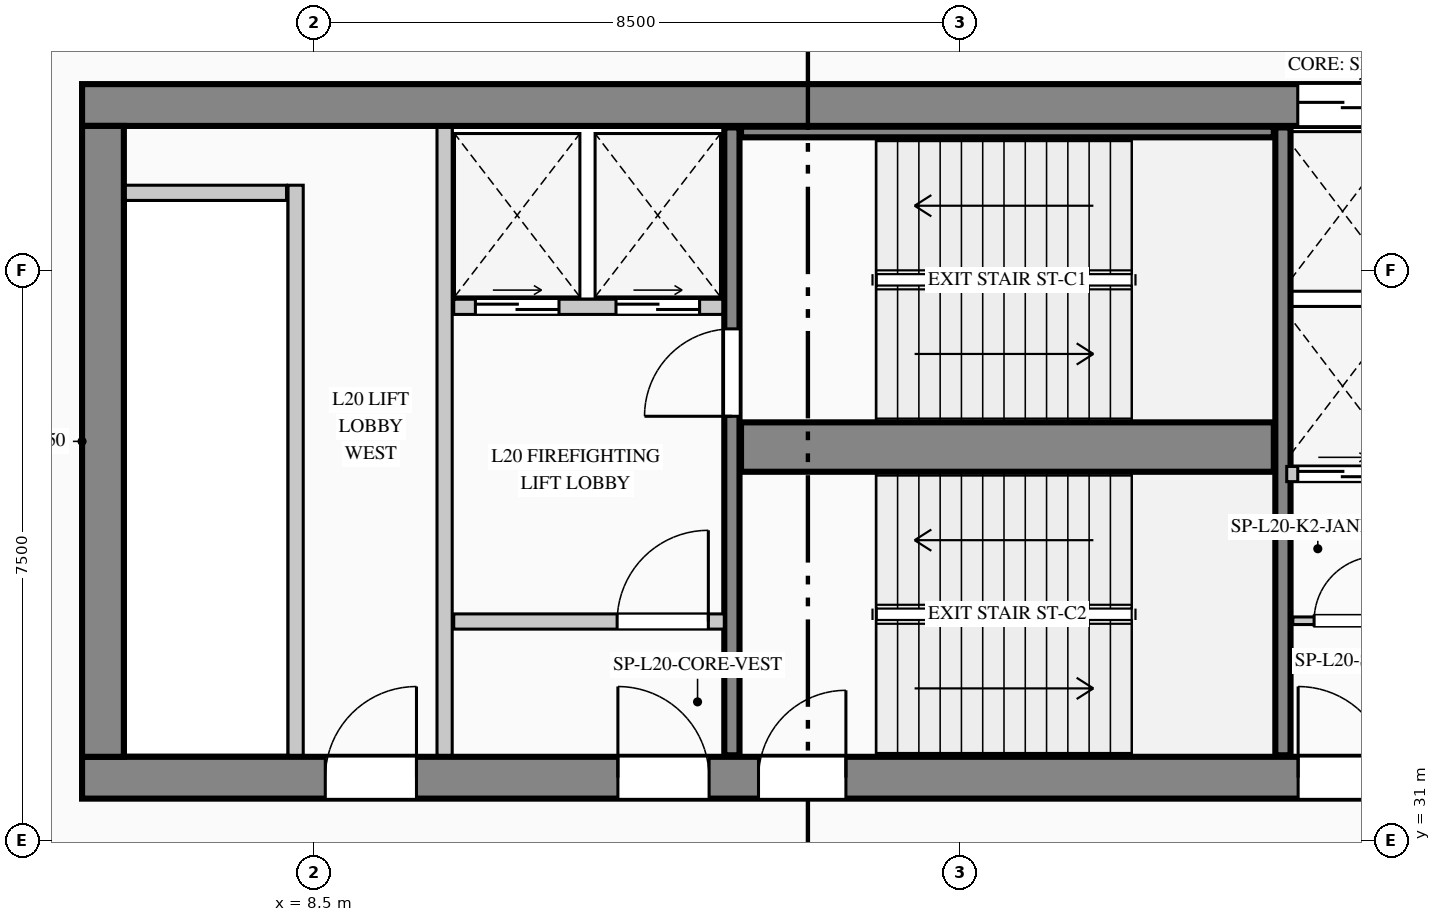
"""IFC4 building model, lengths in metres.
Left out: names, types, materials, properties, quantities, classifications, styles, units other than length and angle.
Written with IfcOpenShell. Run it as: python <this file> out.ifc"""

import sys

from ifc_helpers import new_model, si_unit, direction, frame, frame_2d, origin, place, context, subcontext, project, spatial, rectangle, extrude, element, fill, save


model = new_model("IFC4")
c1 = context("Model", 3, precision=1e-05, world=origin(), true_north=direction((0.0, 1.0)))
c2 = subcontext(c1, "Body", "Model", "MODEL_VIEW")
j1 = project(units=[si_unit("LENGTHUNIT", "METRE"), si_unit("PLANEANGLEUNIT", "RADIAN")], contexts=[c1])
p1 = place(None, origin())
s1 = spatial("IfcSite", under=j1, at=p1, CompositionType="ELEMENT")
p2 = place(p1, origin())
s2 = spatial("IfcBuilding", under=s1, at=p2, CompositionType="ELEMENT")
p3 = place(p2, frame((0.0, 0.0, 88.6)))
s3 = spatial("IfcBuildingStorey", under=s2, at=p3, CompositionType="ELEMENT", Elevation=88.6)
p4 = place(p3, frame((5.45, 40.675, 0.0), z_axis=(0.0, 0.0, 1.0), x_axis=(1.0, 0.0, 0.0)))
e1 = element("IfcWall", 1, at=p4, inside=s3, PredefinedType="SHEAR", context=c2, shape_type="SweptSolid", body=[
    extrude(rectangle(XDim=17.95, YDim=0.55, at=frame_2d((8.975, 0.0))), origin(), (0.0, 0.0, 1.0), 4.4),
])
p5 = place(p4, frame((15.995, 0.0, 0.0)))
e2 = element("IfcOpeningElement", 2, at=p5, cuts=e1, PredefinedType="OPENING", context=c2, shape_type="SweptSolid", body=[
    extrude(rectangle(XDim=1.18, YDim=2.25, at=frame_2d((0.59, 1.125))), frame((0.0, 0.285, 0.0), z_axis=(0.0, -1.0, 0.0), x_axis=(1.0, 0.0, 0.0)), (0.0, 0.0, 1.0), 0.57),
])
p6 = place(p3, frame((5.45, 31.825, 0.0), z_axis=(0.0, 0.0, 1.0), x_axis=(1.0, 0.0, 0.0)))
e3 = element("IfcWall", 3, at=p6, inside=s3, PredefinedType="SHEAR", context=c2, shape_type="SweptSolid", body=[
    extrude(rectangle(XDim=17.95, YDim=0.55, at=frame_2d((8.975, 0.0))), origin(), (0.0, 0.0, 1.0), 4.4),
])
p7 = place(p6, frame((3.2, 0.0, 0.0)))
e4 = element("IfcOpeningElement", 4, at=p7, cuts=e3, PredefinedType="OPENING", context=c2, shape_type="SweptSolid", body=[
    extrude(rectangle(XDim=1.2, YDim=2.2, at=frame_2d((0.6, 1.1))), frame((0.0, 0.285, 0.0), z_axis=(0.0, -1.0, 0.0), x_axis=(1.0, 0.0, 0.0)), (0.0, 0.0, 1.0), 0.57),
])
p8 = place(p6, frame((7.05, 0.0, 0.0)))
e5 = element("IfcOpeningElement", 5, at=p8, cuts=e3, PredefinedType="OPENING", context=c2, shape_type="SweptSolid", body=[
    extrude(rectangle(XDim=1.2, YDim=2.2, at=frame_2d((0.6, 1.1))), frame((0.0, 0.285, 0.0), z_axis=(0.0, -1.0, 0.0), x_axis=(1.0, 0.0, 0.0)), (0.0, 0.0, 1.0), 0.57),
])
p9 = place(p6, frame((8.9, 0.0, 0.0)))
e6 = element("IfcOpeningElement", 6, at=p9, cuts=e3, PredefinedType="OPENING", context=c2, shape_type="SweptSolid", body=[
    extrude(rectangle(XDim=1.15, YDim=2.2, at=frame_2d((0.575, 1.1))), frame((0.0, 0.285, 0.0), z_axis=(0.0, -1.0, 0.0), x_axis=(1.0, 0.0, 0.0)), (0.0, 0.0, 1.0), 0.57),
])
p10 = place(p6, frame((16.0, 0.0, 0.0)))
e7 = element("IfcOpeningElement", 7, at=p10, cuts=e3, PredefinedType="OPENING", context=c2, shape_type="SweptSolid", body=[
    extrude(rectangle(XDim=1.2, YDim=2.2, at=frame_2d((0.6, 1.1))), frame((0.0, 0.285, 0.0), z_axis=(0.0, -1.0, 0.0), x_axis=(1.0, 0.0, 0.0)), (0.0, 0.0, 1.0), 0.57),
])
p11 = place(p3, frame((5.725, 32.1, 0.0), z_axis=(0.0, 0.0, 1.0), x_axis=(0.0, 1.0, 0.0)))
e8 = element("IfcWall", 8, at=p11, inside=s3, PredefinedType="SHEAR", context=c2, shape_type="SweptSolid", body=[
    extrude(rectangle(XDim=8.3, YDim=0.55, at=frame_2d((4.15, 0.0))), origin(), (0.0, 0.0, 1.0), 4.4),
])
p12 = place(p3, frame((14.0, 32.12, 0.0), z_axis=(0.0, 0.0, 1.0), x_axis=(0.0, 1.0, 0.0)))
e9 = element("IfcWall", 9, at=p12, inside=s3, PredefinedType="SHEAR", context=c2, shape_type="SweptSolid", body=[
    extrude(rectangle(XDim=8.26, YDim=0.2, at=frame_2d((4.13, 0.0))), origin(), (0.0, 0.0, 1.0), 4.4),
])
p13 = place(p12, frame((4.46, 0.0, 0.0)))
e10 = element("IfcOpeningElement", 10, at=p13, cuts=e9, PredefinedType="OPENING", context=c2, shape_type="SweptSolid", body=[
    extrude(rectangle(XDim=1.15, YDim=2.2, at=frame_2d((0.575, 1.1))), frame((0.0, 0.11, 0.0), z_axis=(0.0, -1.0, 0.0), x_axis=(1.0, 0.0, 0.0)), (0.0, 0.0, 1.0), 0.22),
])
p14 = place(p3, frame((14.12, 36.175, 0.0), z_axis=(0.0, 0.0, 1.0), x_axis=(1.0, 0.0, 0.0)))
e11 = element("IfcWall", 11, at=p14, inside=s3, PredefinedType="SHEAR", context=c2, shape_type="SweptSolid", body=[
    extrude(rectangle(XDim=7.01, YDim=0.65, at=frame_2d((3.505, 0.0))), origin(), (0.0, 0.0, 1.0), 4.4),
])
p15 = place(p3, frame((21.25, 32.12, 0.0), z_axis=(0.0, 0.0, 1.0), x_axis=(0.0, 1.0, 0.0)))
e12 = element("IfcWall", 12, at=p15, inside=s3, PredefinedType="SHEAR", context=c2, shape_type="SweptSolid", body=[
    extrude(rectangle(XDim=8.26, YDim=0.2, at=frame_2d((4.13, 0.0))), origin(), (0.0, 0.0, 1.0), 4.4),
])
p16 = place(p3, frame((14.12, 40.32, 0.0), z_axis=(0.0, 0.0, 1.0), x_axis=(1.0, 0.0, 0.0)))
e13 = element("IfcWall", 13, at=p16, inside=s3, PredefinedType="SHEAR", context=c2, shape_type="SweptSolid", body=[
    extrude(rectangle(XDim=7.01, YDim=0.14, at=frame_2d((3.505, 0.0))), origin(), (0.0, 0.0, 1.0), 4.4),
])
p17 = place(p3, frame((8.523, 4.84, 0.0), z_axis=(0.0, 0.0, 1.0), x_axis=(-0.150394554312, 0.988626055712, 0.0)))
e14 = element("IfcWall", 14, at=p17, inside=s3, PredefinedType="STANDARD", context=c2, shape_type="SweptSolid", body=[
    extrude(rectangle(XDim=36.738, YDim=0.28, at=frame_2d((18.369, 0.0))), origin(), (0.0, 0.0, 1.0), 4.115),
])
p18 = place(p17, frame((22.612, 0.0, 0.9)))
e15 = element("IfcOpeningElement", 15, at=p18, cuts=e14, PredefinedType="OPENING", context=c2, shape_type="SweptSolid", body=[
    extrude(rectangle(XDim=1.8, YDim=2.1, at=frame_2d((0.9, 1.05))), frame((0.0, 0.15, 0.0), z_axis=(0.0, -1.0, 0.0), x_axis=(1.0, 0.0, 0.0)), (0.0, 0.0, 1.0), 0.3),
])
p19 = place(p3, frame((8.26, 32.12, 0.0), z_axis=(0.0, 0.0, 1.0), x_axis=(0.0, 1.0, 0.0)))
e16 = element("IfcWall", 16, at=p19, inside=s3, PredefinedType="PARTITIONING", context=c2, shape_type="SweptSolid", body=[
    extrude(rectangle(XDim=7.5, YDim=0.2, at=frame_2d((3.75, 0.0))), origin(), (0.0, 0.0, 1.0), 4.115),
])
p20 = place(p3, frame((6.02, 39.52, 0.0), z_axis=(0.0, 0.0, 1.0), x_axis=(1.0, 0.0, 0.0)))
e17 = element("IfcWall", 17, at=p20, inside=s3, PredefinedType="PARTITIONING", context=c2, shape_type="SweptSolid", body=[
    extrude(rectangle(XDim=2.12, YDim=0.2, at=frame_2d((1.06, 0.0))), origin(), (0.0, 0.0, 1.0), 4.115),
])
p21 = place(p3, frame((10.22, 32.12, 0.0), z_axis=(0.0, 0.0, 1.0), x_axis=(0.0, 1.0, 0.0)))
e18 = element("IfcWall", 18, at=p21, inside=s3, PredefinedType="PARTITIONING", context=c2, shape_type="SweptSolid", body=[
    extrude(rectangle(XDim=8.26, YDim=0.2, at=frame_2d((4.13, 0.0))), origin(), (0.0, 0.0, 1.0), 4.115),
])
p22 = place(p3, frame((10.34, 38.02, 0.0), z_axis=(0.0, 0.0, 1.0), x_axis=(1.0, 0.0, 0.0)))
e19 = element("IfcWall", 19, at=p22, inside=s3, PredefinedType="PARTITIONING", context=c2, shape_type="SweptSolid", body=[
    extrude(rectangle(XDim=3.54, YDim=0.2, at=frame_2d((1.77, 0.0))), origin(), (0.0, 0.0, 1.0), 4.115),
])
p23 = place(p22, frame((0.285, 0.0, 0.0)))
e20 = element("IfcOpeningElement", 20, at=p23, cuts=e19, PredefinedType="OPENING", context=c2, shape_type="SweptSolid", body=[
    extrude(rectangle(XDim=1.1, YDim=2.2, at=frame_2d((0.55, 1.1))), frame((0.0, 0.11, 0.0), z_axis=(0.0, -1.0, 0.0), x_axis=(1.0, 0.0, 0.0)), (0.0, 0.0, 1.0), 0.22),
])
p24 = place(p22, frame((2.135, 0.0, 0.0)))
e21 = element("IfcOpeningElement", 21, at=p24, cuts=e19, PredefinedType="OPENING", context=c2, shape_type="SweptSolid", body=[
    extrude(rectangle(XDim=1.1, YDim=2.2, at=frame_2d((0.55, 1.1))), frame((0.0, 0.11, 0.0), z_axis=(0.0, -1.0, 0.0), x_axis=(1.0, 0.0, 0.0)), (0.0, 0.0, 1.0), 0.22),
])
p25 = place(p3, frame((10.34, 33.88, 0.0), z_axis=(0.0, 0.0, 1.0), x_axis=(1.0, 0.0, 0.0)))
e22 = element("IfcWall", 22, at=p25, inside=s3, PredefinedType="PARTITIONING", context=c2, shape_type="SweptSolid", body=[
    extrude(rectangle(XDim=3.56, YDim=0.2, at=frame_2d((1.78, 0.0))), origin(), (0.0, 0.0, 1.0), 4.115),
])
p26 = place(p25, frame((2.15, 0.0, 0.0)))
e23 = element("IfcOpeningElement", 23, at=p26, cuts=e22, PredefinedType="OPENING", context=c2, shape_type="SweptSolid", body=[
    extrude(rectangle(XDim=1.2, YDim=2.2, at=frame_2d((0.6, 1.1))), frame((0.0, 0.11, 0.0), z_axis=(0.0, -1.0, 0.0), x_axis=(1.0, 0.0, 0.0)), (0.0, 0.0, 1.0), 0.22),
])
p27 = place(p3, frame((21.38, 33.89, 0.0), z_axis=(0.0, 0.0, 1.0), x_axis=(1.0, 0.0, 0.0)))
e24 = element("IfcWall", 24, at=p27, inside=s3, PredefinedType="PARTITIONING", context=c2, shape_type="SweptSolid", body=[
    extrude(rectangle(XDim=1.42, YDim=0.1, at=frame_2d((0.71, 0.0))), origin(), (0.0, 0.0, 1.0), 4.115),
])
p28 = place(p27, frame((0.28, 0.0, 0.0)))
e25 = element("IfcOpeningElement", 25, at=p28, cuts=e24, PredefinedType="OPENING", context=c2, shape_type="SweptSolid", body=[
    extrude(rectangle(XDim=0.85, YDim=2.1, at=frame_2d((0.425, 1.05))), frame((0.0, 0.06, 0.0), z_axis=(0.0, -1.0, 0.0), x_axis=(1.0, 0.0, 0.0)), (0.0, 0.0, 1.0), 0.12),
])
p29 = place(p3, frame((21.3, 35.82, 0.0), z_axis=(0.0, 0.0, 1.0), x_axis=(1.0, 0.0, 0.0)))
e26 = element("IfcWall", 26, at=p29, inside=s3, PredefinedType="PARTITIONING", context=c2, shape_type="SweptSolid", body=[
    extrude(rectangle(XDim=1.5, YDim=0.2, at=frame_2d((0.75, 0.0))), origin(), (0.0, 0.0, 1.0), 4.115),
])
p30 = place(p29, frame((0.145, 0.0, 0.0)))
e27 = element("IfcOpeningElement", 27, at=p30, cuts=e26, PredefinedType="OPENING", context=c2, shape_type="SweptSolid", body=[
    extrude(rectangle(XDim=1.18, YDim=2.25, at=frame_2d((0.59, 1.125))), frame((0.0, 0.11, 0.0), z_axis=(0.0, -1.0, 0.0), x_axis=(1.0, 0.0, 0.0)), (0.0, 0.0, 1.0), 0.22),
])
p31 = place(p7, origin())
e28 = element("IfcDoor", 28, at=p31, inside=s3, OperationType="SINGLE_SWING_RIGHT", PredefinedType="DOOR", context=c2, shape_type="SweptSolid", body=[
    extrude(rectangle(XDim=1.2, YDim=2.2, at=frame_2d((0.6, 1.1))), frame((0.0, 0.025, 0.0), z_axis=(0.0, -1.0, 0.0), x_axis=(1.0, 0.0, 0.0)), (0.0, 0.0, 1.0), 0.05),
])
fill(e4, e28)
p32 = place(p8, origin())
e29 = element("IfcDoor", 29, at=p32, inside=s3, OperationType="SINGLE_SWING_LEFT", PredefinedType="DOOR", context=c2, shape_type="SweptSolid", body=[
    extrude(rectangle(XDim=1.2, YDim=2.2, at=frame_2d((0.6, 1.1))), frame((0.0, 0.025, 0.0), z_axis=(0.0, -1.0, 0.0), x_axis=(1.0, 0.0, 0.0)), (0.0, 0.0, 1.0), 0.05),
])
fill(e5, e29)
p33 = place(p9, origin())
e30 = element("IfcDoor", 30, at=p33, inside=s3, OperationType="SINGLE_SWING_RIGHT", PredefinedType="DOOR", context=c2, shape_type="SweptSolid", body=[
    extrude(rectangle(XDim=1.15, YDim=2.2, at=frame_2d((0.575, 1.1))), frame((0.0, 0.025, 0.0), z_axis=(0.0, -1.0, 0.0), x_axis=(1.0, 0.0, 0.0)), (0.0, 0.0, 1.0), 0.05),
])
fill(e6, e30)
p34 = place(p10, origin())
e31 = element("IfcDoor", 31, at=p34, inside=s3, OperationType="SINGLE_SWING_LEFT", PredefinedType="DOOR", context=c2, shape_type="SweptSolid", body=[
    extrude(rectangle(XDim=1.2, YDim=2.2, at=frame_2d((0.6, 1.1))), frame((0.0, 0.025, 0.0), z_axis=(0.0, -1.0, 0.0), x_axis=(1.0, 0.0, 0.0)), (0.0, 0.0, 1.0), 0.05),
])
fill(e7, e31)
p35 = place(p26, origin())
e32 = element("IfcDoor", 32, at=p35, inside=s3, OperationType="SINGLE_SWING_RIGHT", PredefinedType="DOOR", context=c2, shape_type="SweptSolid", body=[
    extrude(rectangle(XDim=1.2, YDim=2.2, at=frame_2d((0.6, 1.1))), frame((0.0, 0.025, 0.0), z_axis=(0.0, -1.0, 0.0), x_axis=(1.0, 0.0, 0.0)), (0.0, 0.0, 1.0), 0.05),
])
fill(e23, e32)
p36 = place(p28, origin())
e33 = element("IfcDoor", 33, at=p36, inside=s3, OperationType="SINGLE_SWING_RIGHT", PredefinedType="DOOR", context=c2, shape_type="SweptSolid", body=[
    extrude(rectangle(XDim=0.85, YDim=2.1, at=frame_2d((0.425, 1.05))), frame((0.0, 0.025, 0.0), z_axis=(0.0, -1.0, 0.0), x_axis=(1.0, 0.0, 0.0)), (0.0, 0.0, 1.0), 0.05),
])
fill(e25, e33)
p37 = place(p13, origin())
e34 = element("IfcDoor", 34, at=p37, inside=s3, OperationType="SINGLE_SWING_LEFT", PredefinedType="DOOR", context=c2, shape_type="SweptSolid", body=[
    extrude(rectangle(XDim=1.15, YDim=2.2, at=frame_2d((0.575, 1.1))), frame((0.0, 0.025, 0.0), z_axis=(0.0, -1.0, 0.0), x_axis=(1.0, 0.0, 0.0)), (0.0, 0.0, 1.0), 0.05),
])
fill(e10, e34)
p38 = place(p23, origin())
e35 = element("IfcDoor", 35, at=p38, inside=s3, OperationType="DOUBLE_DOOR_SLIDING", PredefinedType="DOOR", context=c2, shape_type="SweptSolid", body=[
    extrude(rectangle(XDim=1.1, YDim=2.2, at=frame_2d((0.55, 1.1))), frame((0.0, 0.025, 0.0), z_axis=(0.0, -1.0, 0.0), x_axis=(1.0, 0.0, 0.0)), (0.0, 0.0, 1.0), 0.05),
])
fill(e20, e35)
p39 = place(p24, origin())
e36 = element("IfcDoor", 36, at=p39, inside=s3, OperationType="DOUBLE_DOOR_SLIDING", PredefinedType="DOOR", context=c2, shape_type="SweptSolid", body=[
    extrude(rectangle(XDim=1.1, YDim=2.2, at=frame_2d((0.55, 1.1))), frame((0.0, 0.025, 0.0), z_axis=(0.0, -1.0, 0.0), x_axis=(1.0, 0.0, 0.0)), (0.0, 0.0, 1.0), 0.05),
])
fill(e21, e36)
p40 = place(p5, origin())
e37 = element("IfcDoor", 37, at=p40, inside=s3, OperationType="DOUBLE_DOOR_SLIDING", PredefinedType="DOOR", context=c2, shape_type="SweptSolid", body=[
    extrude(rectangle(XDim=1.18, YDim=2.25, at=frame_2d((0.59, 1.125))), frame((0.0, 0.025, 0.0), z_axis=(0.0, -1.0, 0.0), x_axis=(1.0, 0.0, 0.0)), (0.0, 0.0, 1.0), 0.05),
])
fill(e2, e37)
p41 = place(p30, origin())
e38 = element("IfcDoor", 38, at=p41, inside=s3, OperationType="DOUBLE_DOOR_SLIDING", PredefinedType="DOOR", context=c2, shape_type="SweptSolid", body=[
    extrude(rectangle(XDim=1.18, YDim=2.25, at=frame_2d((0.59, 1.125))), frame((0.0, 0.025, 0.0), z_axis=(0.0, -1.0, 0.0), x_axis=(1.0, 0.0, 0.0)), (0.0, 0.0, 1.0), 0.05),
])
fill(e27, e38)
save(model, sys.argv[1])
